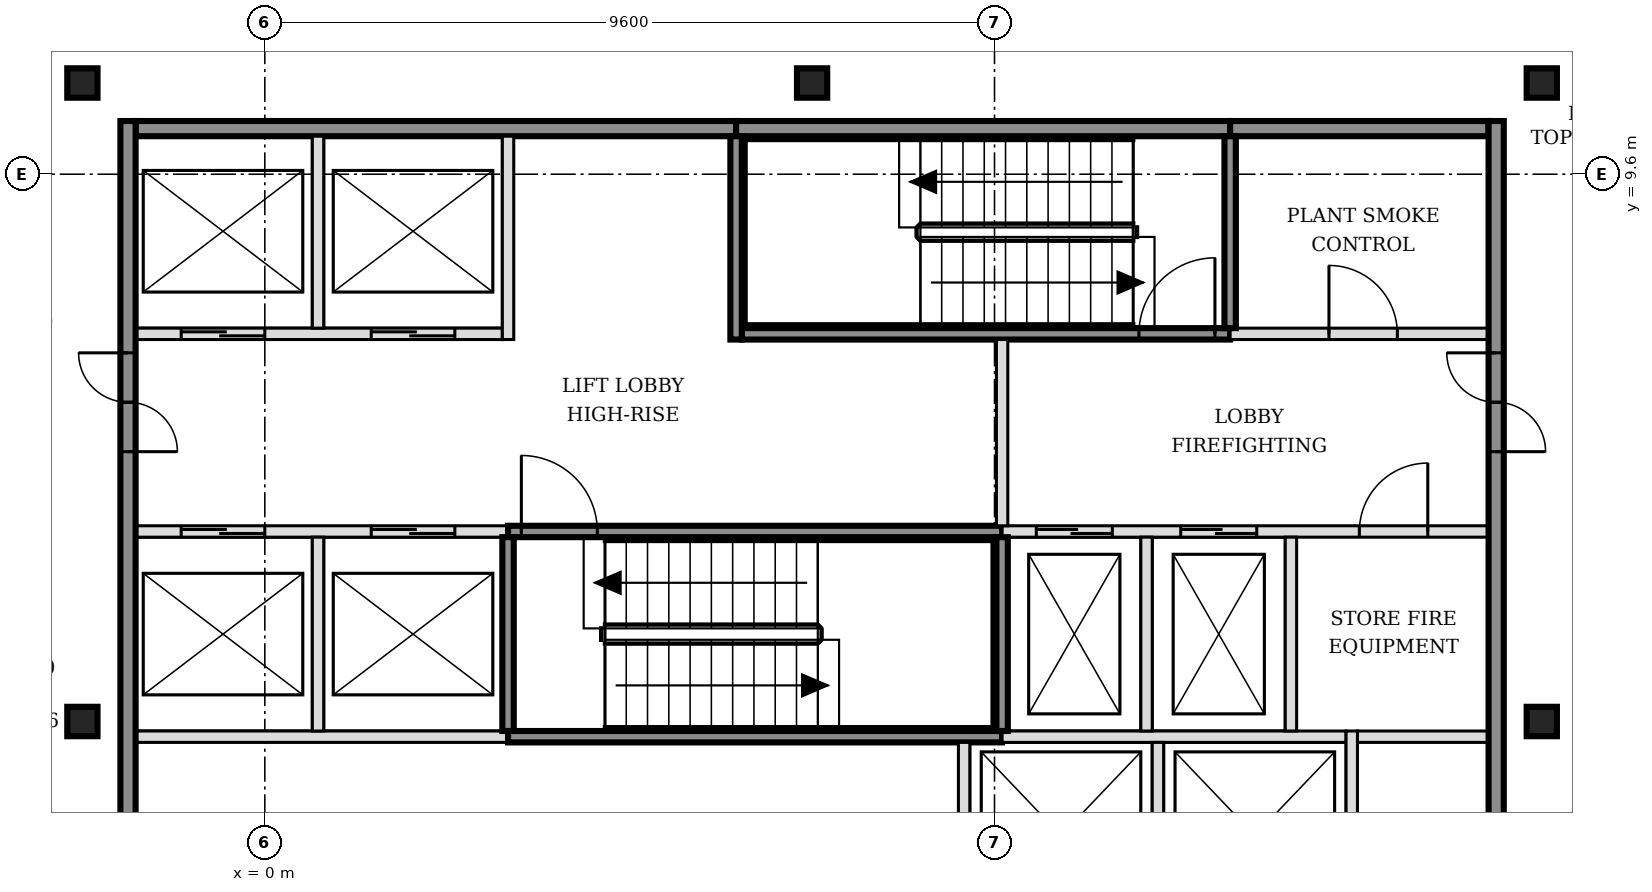
"""IFC4 building model, lengths in metres.
Left out: names, types, materials, properties, quantities, classifications, styles, units other than length and angle.
Written with IfcOpenShell. Run it as: python <this file> out.ifc"""

import sys

from ifc_helpers import new_model, si_unit, direction, frame, frame_2d, origin, origin_2d, place, context, subcontext, project, spatial, rectangle, i_section, extrude, element, fill, save


model = new_model("IFC4")
c1 = context("Model", 3, precision=1e-05, world=origin(), true_north=direction((0.0, 1.0)))
c2 = subcontext(c1, "Body", "Model", "MODEL_VIEW")
j1 = project(units=[si_unit("LENGTHUNIT", "METRE"), si_unit("PLANEANGLEUNIT", "RADIAN")], contexts=[c1])
p1 = place(None, origin())
s1 = spatial("IfcSite", under=j1, at=p1, CompositionType="ELEMENT")
p2 = place(p1, origin())
s2 = spatial("IfcBuilding", under=s1, at=p2, CompositionType="ELEMENT")
p3 = place(p2, frame((0.0, 0.0, 246.6)))
s3 = spatial("IfcBuildingStorey", under=s2, at=p3, CompositionType="ELEMENT", Elevation=246.6)
for number, where, z_axis, x_axis in (
    (1, (-2.4, 2.4, -0.15), (0.0, 0.0, 1.0), (1.0, 0.0, 0.0)),
    (2, (16.8, 2.4, -0.15), (0.0, 0.0, 1.0), (1.0, 0.0, 0.0)),
    (3, (-2.4, 10.8, -0.15), (0.0, 0.0, 1.0), (1.0, 0.0, 0.0)),
    (4, (7.2, 10.8, -0.15), (0.0, 0.0, 1.0), (1.0, 0.0, 0.0)),
    (5, (16.8, 10.8, -0.15), (0.0, 0.0, 1.0), (1.0, 0.0, 0.0)),
):
    element("IfcColumn", number, at=place(p3, frame(where, z_axis=z_axis, x_axis=x_axis)), inside=s3, PredefinedType="COLUMN", context=c2, shape_type="SweptSolid", body=[
        extrude(i_section(OverallWidth=0.398, OverallDepth=0.387, WebThickness=0.021, FlangeThickness=0.033, FilletRadius=0.015, at=origin_2d()), origin(), (0.0, 0.0, 1.0), 3.6),
    ])
p4 = place(p3, frame((-1.7, 2.2, 0.0), z_axis=(0.0, 0.0, 1.0), x_axis=(1.0, 0.0, 0.0)))
e6 = element("IfcWall", 6, at=p4, inside=s3, PredefinedType="SOLIDWALL", context=c2, shape_type="SweptSolid", body=[
    extrude(rectangle(XDim=4.9, YDim=0.15, at=frame_2d((2.45, 0.0))), origin(), (0.0, 0.0, 1.0), 3.45),
])
p5 = place(p3, frame((3.2, 2.2, 0.0), z_axis=(0.0, 0.0, 1.0), x_axis=(1.0, 0.0, 0.0)))
e7 = element("IfcWall", 7, at=p5, inside=s3, PredefinedType="SOLIDWALL", context=c2, shape_type="SweptSolid", body=[
    extrude(rectangle(XDim=6.5, YDim=0.15, at=frame_2d((3.25, 0.0))), origin(), (0.0, 0.0, 1.0), 3.45),
])
p6 = place(p3, frame((9.7, 2.2, 0.0), z_axis=(0.0, 0.0, 1.0), x_axis=(1.0, 0.0, 0.0)))
e8 = element("IfcWall", 8, at=p6, inside=s3, PredefinedType="SOLIDWALL", context=c2, shape_type="SweptSolid", body=[
    extrude(rectangle(XDim=4.525, YDim=0.15, at=frame_2d((2.263, 0.0))), origin(), (0.0, 0.0, 1.0), 3.45),
])
p7 = place(p3, frame((14.375, 2.2, 0.0), z_axis=(0.0, 0.0, 1.0), x_axis=(1.0, 0.0, 0.0)))
e9 = element("IfcWall", 9, at=p7, inside=s3, PredefinedType="PARTITIONING", context=c2, shape_type="SweptSolid", body=[
    extrude(rectangle(XDim=1.725, YDim=0.15, at=frame_2d((0.863, 0.0))), origin(), (0.0, 0.0, 1.0), 3.45),
])
p8 = place(p3, frame((-1.7, 4.9, 0.0), z_axis=(0.0, 0.0, 1.0), x_axis=(1.0, 0.0, 0.0)))
e10 = element("IfcWall", 10, at=p8, inside=s3, PredefinedType="SOLIDWALL", context=c2, shape_type="SweptSolid", body=[
    extrude(rectangle(XDim=4.9, YDim=0.15, at=frame_2d((2.45, 0.0))), origin(), (0.0, 0.0, 1.0), 3.45),
])
p9 = place(p8, frame((0.6, 0.0, 0.0)))
e11 = element("IfcOpeningElement", 11, at=p9, cuts=e10, PredefinedType="OPENING", context=c2, shape_type="SweptSolid", body=[
    extrude(rectangle(XDim=1.1, YDim=2.1, at=frame_2d((0.55, 1.05))), frame((0.0, 0.085, 0.0), z_axis=(0.0, -1.0, 0.0), x_axis=(1.0, 0.0, 0.0)), (0.0, 0.0, 1.0), 0.17),
])
p10 = place(p8, frame((3.1, 0.0, 0.0)))
e12 = element("IfcOpeningElement", 12, at=p10, cuts=e10, PredefinedType="OPENING", context=c2, shape_type="SweptSolid", body=[
    extrude(rectangle(XDim=1.1, YDim=2.1, at=frame_2d((0.55, 1.05))), frame((0.0, 0.085, 0.0), z_axis=(0.0, -1.0, 0.0), x_axis=(1.0, 0.0, 0.0)), (0.0, 0.0, 1.0), 0.17),
])
p11 = place(p3, frame((3.2, 4.9, 0.0), z_axis=(0.0, 0.0, 1.0), x_axis=(1.0, 0.0, 0.0)))
e13 = element("IfcWall", 13, at=p11, inside=s3, PredefinedType="SOLIDWALL", context=c2, shape_type="SweptSolid", body=[
    extrude(rectangle(XDim=6.5, YDim=0.15, at=frame_2d((3.25, 0.0))), origin(), (0.0, 0.0, 1.0), 3.45),
])
p12 = place(p11, frame((0.175, 0.0, 0.0)))
e14 = element("IfcOpeningElement", 14, at=p12, cuts=e13, PredefinedType="OPENING", context=c2, shape_type="SweptSolid", body=[
    extrude(rectangle(XDim=1.0, YDim=2.1, at=frame_2d((0.5, 1.05))), frame((0.0, 0.085, 0.0), z_axis=(0.0, -1.0, 0.0), x_axis=(1.0, 0.0, 0.0)), (0.0, 0.0, 1.0), 0.17),
])
p13 = place(p3, frame((9.7, 4.9, 0.0), z_axis=(0.0, 0.0, 1.0), x_axis=(1.0, 0.0, 0.0)))
e15 = element("IfcWall", 15, at=p13, inside=s3, PredefinedType="SOLIDWALL", context=c2, shape_type="SweptSolid", body=[
    extrude(rectangle(XDim=6.4, YDim=0.15, at=frame_2d((3.2, 0.0))), origin(), (0.0, 0.0, 1.0), 3.45),
])
p14 = place(p13, frame((0.45, 0.0, 0.0)))
e16 = element("IfcOpeningElement", 16, at=p14, cuts=e15, PredefinedType="OPENING", context=c2, shape_type="SweptSolid", body=[
    extrude(rectangle(XDim=1.0, YDim=2.1, at=frame_2d((0.5, 1.05))), frame((0.0, 0.085, 0.0), z_axis=(0.0, -1.0, 0.0), x_axis=(1.0, 0.0, 0.0)), (0.0, 0.0, 1.0), 0.17),
])
p15 = place(p13, frame((2.35, 0.0, 0.0)))
e17 = element("IfcOpeningElement", 17, at=p15, cuts=e15, PredefinedType="OPENING", context=c2, shape_type="SweptSolid", body=[
    extrude(rectangle(XDim=1.0, YDim=2.1, at=frame_2d((0.5, 1.05))), frame((0.0, 0.085, 0.0), z_axis=(0.0, -1.0, 0.0), x_axis=(1.0, 0.0, 0.0)), (0.0, 0.0, 1.0), 0.17),
])
p16 = place(p13, frame((4.7, 0.0, 0.0)))
e18 = element("IfcOpeningElement", 18, at=p16, cuts=e15, PredefinedType="OPENING", context=c2, shape_type="SweptSolid", body=[
    extrude(rectangle(XDim=0.9, YDim=2.1, at=frame_2d((0.45, 1.05))), frame((0.0, 0.085, 0.0), z_axis=(0.0, -1.0, 0.0), x_axis=(1.0, 0.0, 0.0)), (0.0, 0.0, 1.0), 0.17),
])
p17 = place(p3, frame((-1.7, 7.5, 0.0), z_axis=(0.0, 0.0, 1.0), x_axis=(1.0, 0.0, 0.0)))
e19 = element("IfcWall", 19, at=p17, inside=s3, PredefinedType="SOLIDWALL", context=c2, shape_type="SweptSolid", body=[
    extrude(rectangle(XDim=4.825, YDim=0.15, at=frame_2d((2.413, 0.0))), origin(), (0.0, 0.0, 1.0), 3.45),
])
p18 = place(p17, frame((0.6, 0.0, 0.0)))
e20 = element("IfcOpeningElement", 20, at=p18, cuts=e19, PredefinedType="OPENING", context=c2, shape_type="SweptSolid", body=[
    extrude(rectangle(XDim=1.1, YDim=2.1, at=frame_2d((0.55, 1.05))), frame((0.0, 0.085, 0.0), z_axis=(0.0, -1.0, 0.0), x_axis=(1.0, 0.0, 0.0)), (0.0, 0.0, 1.0), 0.17),
])
p19 = place(p17, frame((3.1, 0.0, 0.0)))
e21 = element("IfcOpeningElement", 21, at=p19, cuts=e19, PredefinedType="OPENING", context=c2, shape_type="SweptSolid", body=[
    extrude(rectangle(XDim=1.1, YDim=2.1, at=frame_2d((0.55, 1.05))), frame((0.0, 0.085, 0.0), z_axis=(0.0, -1.0, 0.0), x_axis=(1.0, 0.0, 0.0)), (0.0, 0.0, 1.0), 0.17),
])
p20 = place(p3, frame((6.275, 7.5, 0.0), z_axis=(0.0, 0.0, 1.0), x_axis=(1.0, 0.0, 0.0)))
e22 = element("IfcWall", 22, at=p20, inside=s3, PredefinedType="SOLIDWALL", context=c2, shape_type="SweptSolid", body=[
    extrude(rectangle(XDim=6.425, YDim=0.15, at=frame_2d((3.212, 0.0))), origin(), (0.0, 0.0, 1.0), 3.45),
])
p21 = place(p20, frame((5.225, 0.0, 0.0)))
e23 = element("IfcOpeningElement", 23, at=p21, cuts=e22, PredefinedType="OPENING", context=c2, shape_type="SweptSolid", body=[
    extrude(rectangle(XDim=1.0, YDim=2.1, at=frame_2d((0.5, 1.05))), frame((0.0, 0.085, 0.0), z_axis=(0.0, -1.0, 0.0), x_axis=(1.0, 0.0, 0.0)), (0.0, 0.0, 1.0), 0.17),
])
p22 = place(p3, frame((12.7, 7.5, 0.0), z_axis=(0.0, 0.0, 1.0), x_axis=(1.0, 0.0, 0.0)))
e24 = element("IfcWall", 24, at=p22, inside=s3, PredefinedType="SOLIDWALL", context=c2, shape_type="SweptSolid", body=[
    extrude(rectangle(XDim=3.4, YDim=0.15, at=frame_2d((1.7, 0.0))), origin(), (0.0, 0.0, 1.0), 3.45),
])
p23 = place(p22, frame((1.3, 0.0, 0.0)))
e25 = element("IfcOpeningElement", 25, at=p23, cuts=e24, PredefinedType="OPENING", context=c2, shape_type="SweptSolid", body=[
    extrude(rectangle(XDim=0.9, YDim=2.1, at=frame_2d((0.45, 1.05))), frame((0.0, 0.085, 0.0), z_axis=(0.0, -1.0, 0.0), x_axis=(1.0, 0.0, 0.0)), (0.0, 0.0, 1.0), 0.17),
])
p24 = place(p3, frame((-1.7, 10.2, 0.0), z_axis=(0.0, 0.0, 1.0), x_axis=(1.0, 0.0, 0.0)))
e26 = element("IfcWall", 26, at=p24, inside=s3, PredefinedType="SOLIDWALL", context=c2, shape_type="SweptSolid", body=[
    extrude(rectangle(XDim=7.9, YDim=0.2, at=frame_2d((3.95, 0.0))), origin(), (0.0, 0.0, 1.0), 3.45),
])
p25 = place(p3, frame((6.2, 10.2, 0.0), z_axis=(0.0, 0.0, 1.0), x_axis=(1.0, 0.0, 0.0)))
e27 = element("IfcWall", 27, at=p25, inside=s3, PredefinedType="SOLIDWALL", context=c2, shape_type="SweptSolid", body=[
    extrude(rectangle(XDim=6.5, YDim=0.2, at=frame_2d((3.25, 0.0))), origin(), (0.0, 0.0, 1.0), 3.45),
])
p26 = place(p3, frame((12.7, 10.2, 0.0), z_axis=(0.0, 0.0, 1.0), x_axis=(1.0, 0.0, 0.0)))
e28 = element("IfcWall", 28, at=p26, inside=s3, PredefinedType="SOLIDWALL", context=c2, shape_type="SweptSolid", body=[
    extrude(rectangle(XDim=3.4, YDim=0.2, at=frame_2d((1.7, 0.0))), origin(), (0.0, 0.0, 1.0), 3.45),
])
p27 = place(p3, frame((-1.8, -5.5, 0.0), z_axis=(0.0, 0.0, 1.0), x_axis=(0.0, 1.0, 0.0)))
e29 = element("IfcWall", 29, at=p27, inside=s3, PredefinedType="SOLIDWALL", context=c2, shape_type="SweptSolid", body=[
    extrude(rectangle(XDim=15.8, YDim=0.2, at=frame_2d((7.9, 0.0))), origin(), (0.0, 0.0, 1.0), 3.45),
])
p28 = place(p27, frame((3.05, 0.0, 0.0)))
e30 = element("IfcOpeningElement", 30, at=p28, cuts=e29, PredefinedType="OPENING", context=c2, shape_type="SweptSolid", body=[
    extrude(rectangle(XDim=1.3, YDim=2.1, at=frame_2d((0.65, 1.05))), frame((0.0, 0.11, 0.0), z_axis=(0.0, -1.0, 0.0), x_axis=(1.0, 0.0, 0.0)), (0.0, 0.0, 1.0), 0.22),
])
p29 = place(p27, frame((11.45, 0.0, 0.0)))
e31 = element("IfcOpeningElement", 31, at=p29, cuts=e29, PredefinedType="OPENING", context=c2, shape_type="SweptSolid", body=[
    extrude(rectangle(XDim=1.3, YDim=2.1, at=frame_2d((0.65, 1.05))), frame((0.0, 0.11, 0.0), z_axis=(0.0, -1.0, 0.0), x_axis=(1.0, 0.0, 0.0)), (0.0, 0.0, 1.0), 0.22),
])
p30 = place(p3, frame((0.7, 2.275, 0.0), z_axis=(0.0, 0.0, 1.0), x_axis=(0.0, 1.0, 0.0)))
e32 = element("IfcWall", 32, at=p30, inside=s3, PredefinedType="SOLIDWALL", context=c2, shape_type="SweptSolid", body=[
    extrude(rectangle(XDim=2.55, YDim=0.15, at=frame_2d((1.275, 0.0))), origin(), (0.0, 0.0, 1.0), 3.45),
])
p31 = place(p3, frame((0.7, 7.575, 0.0), z_axis=(0.0, 0.0, 1.0), x_axis=(0.0, 1.0, 0.0)))
e33 = element("IfcWall", 33, at=p31, inside=s3, PredefinedType="SOLIDWALL", context=c2, shape_type="SweptSolid", body=[
    extrude(rectangle(XDim=2.525, YDim=0.15, at=frame_2d((1.263, 0.0))), origin(), (0.0, 0.0, 1.0), 3.45),
])
p32 = place(p3, frame((3.2, 2.275, 0.0), z_axis=(0.0, 0.0, 1.0), x_axis=(0.0, 1.0, 0.0)))
e34 = element("IfcWall", 34, at=p32, inside=s3, PredefinedType="SOLIDWALL", context=c2, shape_type="SweptSolid", body=[
    extrude(rectangle(XDim=2.55, YDim=0.15, at=frame_2d((1.275, 0.0))), origin(), (0.0, 0.0, 1.0), 3.45),
])
for number, where, z_axis, x_axis in (
    (35, (3.2, 7.425, 0.0), (0.0, 0.0, 1.0), (0.0, 1.0, 0.0)),
    (36, (6.2, 7.425, 0.0), (0.0, 0.0, 1.0), (0.0, 1.0, 0.0)),
):
    element("IfcWall", number, at=place(p3, frame(where, z_axis=z_axis, x_axis=x_axis)), inside=s3, PredefinedType="SOLIDWALL", context=c2, shape_type="SweptSolid", body=[
        extrude(rectangle(XDim=2.675, YDim=0.15, at=frame_2d((1.337, 0.0))), origin(), (0.0, 0.0, 1.0), 3.45),
    ])
p33 = place(p3, frame((9.2, -0.475, 0.0), z_axis=(0.0, 0.0, 1.0), x_axis=(0.0, 1.0, 0.0)))
e37 = element("IfcWall", 37, at=p33, inside=s3, PredefinedType="SOLIDWALL", context=c2, shape_type="SweptSolid", body=[
    extrude(rectangle(XDim=2.6, YDim=0.15, at=frame_2d((1.3, 0.0))), origin(), (0.0, 0.0, 1.0), 3.45),
])
p34 = place(p3, frame((9.7, 2.275, 0.0), z_axis=(0.0, 0.0, 1.0), x_axis=(0.0, 1.0, 0.0)))
e38 = element("IfcWall", 38, at=p34, inside=s3, PredefinedType="SOLIDWALL", context=c2, shape_type="SweptSolid", body=[
    extrude(rectangle(XDim=2.55, YDim=0.15, at=frame_2d((1.275, 0.0))), origin(), (0.0, 0.0, 1.0), 3.45),
])
p35 = place(p3, frame((9.7, 4.975, 0.0), z_axis=(0.0, 0.0, 1.0), x_axis=(0.0, 1.0, 0.0)))
e39 = element("IfcWall", 39, at=p35, inside=s3, PredefinedType="SOLIDWALL", context=c2, shape_type="SweptSolid", body=[
    extrude(rectangle(XDim=2.45, YDim=0.15, at=frame_2d((1.225, 0.0))), origin(), (0.0, 0.0, 1.0), 3.45),
])
p36 = place(p3, frame((11.6, 2.275, 0.0), z_axis=(0.0, 0.0, 1.0), x_axis=(0.0, 1.0, 0.0)))
e40 = element("IfcWall", 40, at=p36, inside=s3, PredefinedType="SOLIDWALL", context=c2, shape_type="SweptSolid", body=[
    extrude(rectangle(XDim=2.55, YDim=0.15, at=frame_2d((1.275, 0.0))), origin(), (0.0, 0.0, 1.0), 3.45),
])
p37 = place(p3, frame((11.75, -0.325, 0.0), z_axis=(0.0, 0.0, 1.0), x_axis=(0.0, 1.0, 0.0)))
e41 = element("IfcWall", 41, at=p37, inside=s3, PredefinedType="SOLIDWALL", context=c2, shape_type="SweptSolid", body=[
    extrude(rectangle(XDim=2.45, YDim=0.15, at=frame_2d((1.225, 0.0))), origin(), (0.0, 0.0, 1.0), 3.45),
])
p38 = place(p3, frame((12.7, 7.575, 0.0), z_axis=(0.0, 0.0, 1.0), x_axis=(0.0, 1.0, 0.0)))
e42 = element("IfcWall", 42, at=p38, inside=s3, PredefinedType="SOLIDWALL", context=c2, shape_type="SweptSolid", body=[
    extrude(rectangle(XDim=2.525, YDim=0.15, at=frame_2d((1.263, 0.0))), origin(), (0.0, 0.0, 1.0), 3.45),
])
p39 = place(p3, frame((13.5, 2.275, 0.0), z_axis=(0.0, 0.0, 1.0), x_axis=(0.0, 1.0, 0.0)))
e43 = element("IfcWall", 43, at=p39, inside=s3, PredefinedType="SOLIDWALL", context=c2, shape_type="SweptSolid", body=[
    extrude(rectangle(XDim=2.55, YDim=0.15, at=frame_2d((1.275, 0.0))), origin(), (0.0, 0.0, 1.0), 3.45),
])
p40 = place(p3, frame((14.3, -0.475, 0.0), z_axis=(0.0, 0.0, 1.0), x_axis=(0.0, 1.0, 0.0)))
e44 = element("IfcWall", 44, at=p40, inside=s3, PredefinedType="SOLIDWALL", context=c2, shape_type="SweptSolid", body=[
    extrude(rectangle(XDim=2.75, YDim=0.15, at=frame_2d((1.375, 0.0))), origin(), (0.0, 0.0, 1.0), 3.45),
])
p41 = place(p3, frame((16.2, -5.5, 0.0), z_axis=(0.0, 0.0, 1.0), x_axis=(0.0, 1.0, 0.0)))
e45 = element("IfcWall", 45, at=p41, inside=s3, PredefinedType="SOLIDWALL", context=c2, shape_type="SweptSolid", body=[
    extrude(rectangle(XDim=15.8, YDim=0.2, at=frame_2d((7.9, 0.0))), origin(), (0.0, 0.0, 1.0), 3.45),
])
p42 = place(p41, frame((3.05, 0.0, 0.0)))
e46 = element("IfcOpeningElement", 46, at=p42, cuts=e45, PredefinedType="OPENING", context=c2, shape_type="SweptSolid", body=[
    extrude(rectangle(XDim=1.3, YDim=2.1, at=frame_2d((0.65, 1.05))), frame((0.0, 0.11, 0.0), z_axis=(0.0, -1.0, 0.0), x_axis=(1.0, 0.0, 0.0)), (0.0, 0.0, 1.0), 0.22),
])
p43 = place(p41, frame((11.45, 0.0, 0.0)))
e47 = element("IfcOpeningElement", 47, at=p43, cuts=e45, PredefinedType="OPENING", context=c2, shape_type="SweptSolid", body=[
    extrude(rectangle(XDim=1.3, YDim=2.1, at=frame_2d((0.65, 1.05))), frame((0.0, 0.11, 0.0), z_axis=(0.0, -1.0, 0.0), x_axis=(1.0, 0.0, 0.0)), (0.0, 0.0, 1.0), 0.22),
])
p44 = place(p9, origin())
e48 = element("IfcDoor", 48, at=p44, inside=s3, OperationType="DOUBLE_DOOR_SLIDING", PredefinedType="DOOR", context=c2, shape_type="SweptSolid", body=[
    extrude(rectangle(XDim=1.1, YDim=2.1, at=frame_2d((0.55, 1.05))), frame((0.0, 0.025, 0.0), z_axis=(0.0, -1.0, 0.0), x_axis=(1.0, 0.0, 0.0)), (0.0, 0.0, 1.0), 0.05),
])
fill(e11, e48)
p45 = place(p10, origin())
e49 = element("IfcDoor", 49, at=p45, inside=s3, OperationType="DOUBLE_DOOR_SLIDING", PredefinedType="DOOR", context=c2, shape_type="SweptSolid", body=[
    extrude(rectangle(XDim=1.1, YDim=2.1, at=frame_2d((0.55, 1.05))), frame((0.0, 0.025, 0.0), z_axis=(0.0, -1.0, 0.0), x_axis=(1.0, 0.0, 0.0)), (0.0, 0.0, 1.0), 0.05),
])
fill(e12, e49)
p46 = place(p18, origin())
e50 = element("IfcDoor", 50, at=p46, inside=s3, OperationType="DOUBLE_DOOR_SLIDING", PredefinedType="DOOR", context=c2, shape_type="SweptSolid", body=[
    extrude(rectangle(XDim=1.1, YDim=2.1, at=frame_2d((0.55, 1.05))), frame((0.0, 0.025, 0.0), z_axis=(0.0, -1.0, 0.0), x_axis=(1.0, 0.0, 0.0)), (0.0, 0.0, 1.0), 0.05),
])
fill(e20, e50)
p47 = place(p19, origin())
e51 = element("IfcDoor", 51, at=p47, inside=s3, OperationType="DOUBLE_DOOR_SLIDING", PredefinedType="DOOR", context=c2, shape_type="SweptSolid", body=[
    extrude(rectangle(XDim=1.1, YDim=2.1, at=frame_2d((0.55, 1.05))), frame((0.0, 0.025, 0.0), z_axis=(0.0, -1.0, 0.0), x_axis=(1.0, 0.0, 0.0)), (0.0, 0.0, 1.0), 0.05),
])
fill(e21, e51)
p48 = place(p14, origin())
e52 = element("IfcDoor", 52, at=p48, inside=s3, OperationType="DOUBLE_DOOR_SLIDING", PredefinedType="DOOR", context=c2, shape_type="SweptSolid", body=[
    extrude(rectangle(XDim=1.0, YDim=2.1, at=frame_2d((0.5, 1.05))), frame((0.0, 0.025, 0.0), z_axis=(0.0, -1.0, 0.0), x_axis=(1.0, 0.0, 0.0)), (0.0, 0.0, 1.0), 0.05),
])
fill(e16, e52)
p49 = place(p15, origin())
e53 = element("IfcDoor", 53, at=p49, inside=s3, OperationType="DOUBLE_DOOR_SLIDING", PredefinedType="DOOR", context=c2, shape_type="SweptSolid", body=[
    extrude(rectangle(XDim=1.0, YDim=2.1, at=frame_2d((0.5, 1.05))), frame((0.0, 0.025, 0.0), z_axis=(0.0, -1.0, 0.0), x_axis=(1.0, 0.0, 0.0)), (0.0, 0.0, 1.0), 0.05),
])
fill(e17, e53)
p50 = place(p12, origin())
e54 = element("IfcDoor", 54, at=p50, inside=s3, OperationType="SINGLE_SWING_LEFT", PredefinedType="DOOR", context=c2, shape_type="SweptSolid", body=[
    extrude(rectangle(XDim=1.0, YDim=2.1, at=frame_2d((0.5, 1.05))), frame((0.0, 0.025, 0.0), z_axis=(0.0, -1.0, 0.0), x_axis=(1.0, 0.0, 0.0)), (0.0, 0.0, 1.0), 0.05),
])
fill(e14, e54)
p51 = place(p21, origin())
e55 = element("IfcDoor", 55, at=p51, inside=s3, OperationType="SINGLE_SWING_RIGHT", PredefinedType="DOOR", context=c2, shape_type="SweptSolid", body=[
    extrude(rectangle(XDim=1.0, YDim=2.1, at=frame_2d((0.5, 1.05))), frame((0.0, 0.025, 0.0), z_axis=(0.0, -1.0, 0.0), x_axis=(1.0, 0.0, 0.0)), (0.0, 0.0, 1.0), 0.05),
])
fill(e23, e55)
p52 = place(p29, origin())
e56 = element("IfcDoor", 56, at=p52, inside=s3, OperationType="DOUBLE_DOOR_SINGLE_SWING", PredefinedType="DOOR", context=c2, shape_type="SweptSolid", body=[
    extrude(rectangle(XDim=1.3, YDim=2.1, at=frame_2d((0.65, 1.05))), frame((0.0, 0.025, 0.0), z_axis=(0.0, -1.0, 0.0), x_axis=(1.0, 0.0, 0.0)), (0.0, 0.0, 1.0), 0.05),
])
fill(e31, e56)
p53 = place(p43, origin())
e57 = element("IfcDoor", 57, at=p53, inside=s3, OperationType="DOUBLE_DOOR_SINGLE_SWING", PredefinedType="DOOR", context=c2, shape_type="SweptSolid", body=[
    extrude(rectangle(XDim=1.3, YDim=2.1, at=frame_2d((0.65, 1.05))), frame((0.0, 0.025, 0.0), z_axis=(0.0, -1.0, 0.0), x_axis=(1.0, 0.0, 0.0)), (0.0, 0.0, 1.0), 0.05),
])
fill(e47, e57)
p54 = place(p16, origin())
e58 = element("IfcDoor", 58, at=p54, inside=s3, OperationType="SINGLE_SWING_RIGHT", PredefinedType="DOOR", context=c2, shape_type="SweptSolid", body=[
    extrude(rectangle(XDim=0.9, YDim=2.1, at=frame_2d((0.45, 1.05))), frame((0.0, 0.025, 0.0), z_axis=(0.0, -1.0, 0.0), x_axis=(1.0, 0.0, 0.0)), (0.0, 0.0, 1.0), 0.05),
])
fill(e18, e58)
p55 = place(p23, origin())
e59 = element("IfcDoor", 59, at=p55, inside=s3, OperationType="SINGLE_SWING_LEFT", PredefinedType="DOOR", context=c2, shape_type="SweptSolid", body=[
    extrude(rectangle(XDim=0.9, YDim=2.1, at=frame_2d((0.45, 1.05))), frame((0.0, 0.025, 0.0), z_axis=(0.0, -1.0, 0.0), x_axis=(1.0, 0.0, 0.0)), (0.0, 0.0, 1.0), 0.05),
])
fill(e25, e59)
save(model, sys.argv[1])
